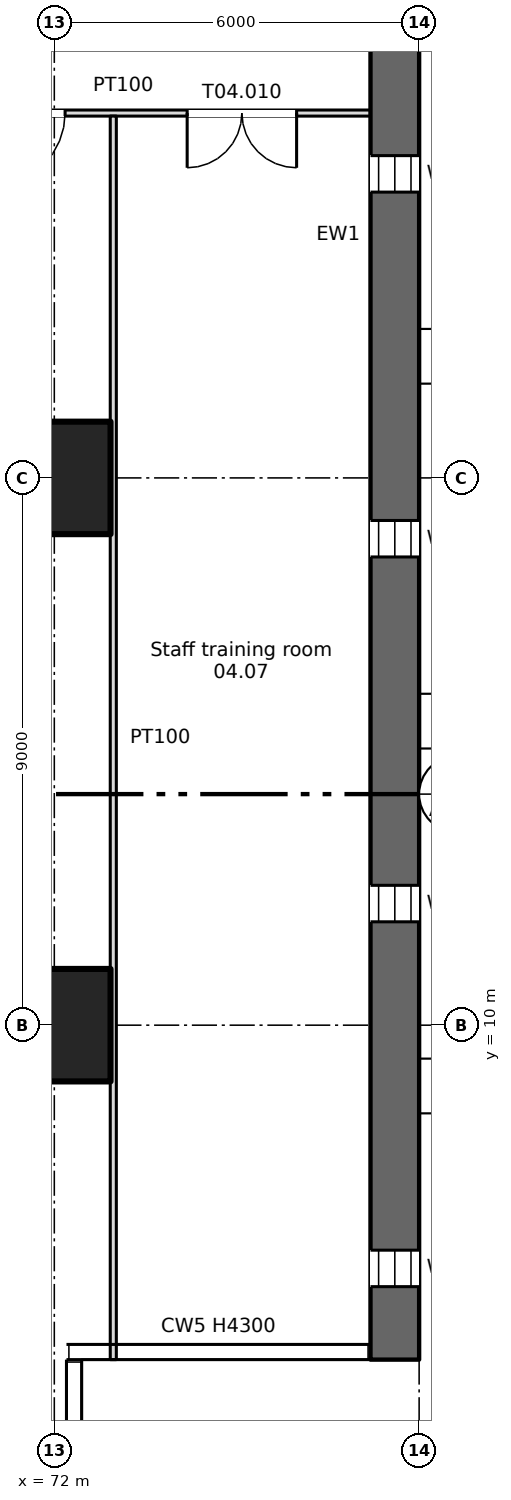
"""IFC4 building model, lengths in metres.
Left out: names, types, materials, properties, quantities, classifications, styles, units other than length and angle.
Written with IfcOpenShell. Run it as: python <this file> out.ifc"""

import sys

from ifc_helpers import new_model, si_unit, direction, frame, frame_2d, origin, origin_2d, place, context, subcontext, project, spatial, rectangle, extrude, element, fill, save


model = new_model("IFC4")
c1 = context("Model", 3, precision=1e-05, world=origin(), true_north=direction((0.0, 1.0)))
c2 = subcontext(c1, "Body", "Model", "MODEL_VIEW")
j1 = project(units=[si_unit("LENGTHUNIT", "METRE"), si_unit("PLANEANGLEUNIT", "RADIAN")], contexts=[c1])
p1 = place(None, origin())
s1 = spatial("IfcSite", under=j1, at=p1, CompositionType="ELEMENT")
p2 = place(p1, origin())
s2 = spatial("IfcBuilding", under=s1, at=p2, CompositionType="ELEMENT")
p3 = place(p2, frame((0.0, 0.0, 6.5)))
s3 = spatial("IfcBuildingStorey", under=s2, at=p3, CompositionType="ELEMENT", Elevation=6.5)
for number, where, z_axis, x_axis in (
    (1, (72.0, 10.0, 0.0), (0.0, 0.0, 1.0), (1.0, 0.0, 0.0)),
    (2, (72.0, 19.0, 0.0), (0.0, 0.0, 1.0), (1.0, 0.0, 0.0)),
):
    element("IfcColumn", number, at=place(p3, frame(where, z_axis=z_axis, x_axis=x_axis)), inside=s3, PredefinedType="COLUMN", context=c2, shape_type="SweptSolid", body=[
        extrude(rectangle(XDim=1.85, YDim=1.85, at=origin_2d()), origin(), (0.0, 0.0, 1.0), 4.3),
    ])
p4 = place(p3, frame((77.6, 4.5, 0.0), z_axis=(0.0, 0.0, 1.0), x_axis=(0.0, 1.0, 0.0)))
e3 = element("IfcWall", 3, at=p4, inside=s3, PredefinedType="SHEAR", context=c2, shape_type="SweptSolid", body=[
    extrude(rectangle(XDim=37.0, YDim=0.8, at=frame_2d((18.5, 0.0))), origin(), (0.0, 0.0, 1.0), 4.3),
])
p5 = place(p4, frame((1.2, 0.0, 0.6)))
e4 = element("IfcOpeningElement", 4, at=p5, cuts=e3, PredefinedType="OPENING", context=c2, shape_type="SweptSolid", body=[
    extrude(rectangle(XDim=0.6, YDim=2.7, at=frame_2d((0.3, 1.35))), frame((0.0, 0.41, 0.0), z_axis=(0.0, -1.0, 0.0), x_axis=(1.0, 0.0, 0.0)), (0.0, 0.0, 1.0), 0.82),
])
p6 = place(p4, frame((7.2, 0.0, 0.6)))
e5 = element("IfcOpeningElement", 5, at=p6, cuts=e3, PredefinedType="OPENING", context=c2, shape_type="SweptSolid", body=[
    extrude(rectangle(XDim=0.6, YDim=2.7, at=frame_2d((0.3, 1.35))), frame((0.0, 0.41, 0.0), z_axis=(0.0, -1.0, 0.0), x_axis=(1.0, 0.0, 0.0)), (0.0, 0.0, 1.0), 0.82),
])
p7 = place(p4, frame((13.2, 0.0, 0.6)))
e6 = element("IfcOpeningElement", 6, at=p7, cuts=e3, PredefinedType="OPENING", context=c2, shape_type="SweptSolid", body=[
    extrude(rectangle(XDim=0.6, YDim=2.7, at=frame_2d((0.3, 1.35))), frame((0.0, 0.41, 0.0), z_axis=(0.0, -1.0, 0.0), x_axis=(1.0, 0.0, 0.0)), (0.0, 0.0, 1.0), 0.82),
])
p8 = place(p4, frame((19.2, 0.0, 0.6)))
e7 = element("IfcOpeningElement", 7, at=p8, cuts=e3, PredefinedType="OPENING", context=c2, shape_type="SweptSolid", body=[
    extrude(rectangle(XDim=0.6, YDim=2.7, at=frame_2d((0.3, 1.35))), frame((0.0, 0.41, 0.0), z_axis=(0.0, -1.0, 0.0), x_axis=(1.0, 0.0, 0.0)), (0.0, 0.0, 1.0), 0.82),
])
p9 = place(p3, frame((67.44, 25.0, 0.0), z_axis=(0.0, 0.0, 1.0), x_axis=(1.0, 0.0, 0.0)))
e8 = element("IfcWall", 8, at=p9, inside=s3, PredefinedType="PARTITIONING", context=c2, shape_type="SweptSolid", body=[
    extrude(rectangle(XDim=9.76, YDim=0.1, at=frame_2d((4.88, 0.0))), origin(), (0.0, 0.0, 1.0), 4.3),
])
p10 = place(p9, frame((0.752, 0.0, 0.0)))
e9 = element("IfcOpeningElement", 9, at=p10, cuts=e8, PredefinedType="OPENING", context=c2, shape_type="SweptSolid", body=[
    extrude(rectangle(XDim=1.2, YDim=2.1, at=frame_2d((0.6, 1.05))), frame((0.0, 0.06, 0.0), z_axis=(0.0, -1.0, 0.0), x_axis=(1.0, 0.0, 0.0)), (0.0, 0.0, 1.0), 0.12),
])
p11 = place(p9, frame((3.538, 0.0, 0.0)))
e10 = element("IfcOpeningElement", 10, at=p11, cuts=e8, PredefinedType="OPENING", context=c2, shape_type="SweptSolid", body=[
    extrude(rectangle(XDim=1.2, YDim=2.1, at=frame_2d((0.6, 1.05))), frame((0.0, 0.06, 0.0), z_axis=(0.0, -1.0, 0.0), x_axis=(1.0, 0.0, 0.0)), (0.0, 0.0, 1.0), 0.12),
])
p12 = place(p9, frame((6.745, 0.0, 0.0)))
e11 = element("IfcOpeningElement", 11, at=p12, cuts=e8, PredefinedType="OPENING", context=c2, shape_type="SweptSolid", body=[
    extrude(rectangle(XDim=1.8, YDim=2.1, at=frame_2d((0.9, 1.05))), frame((0.0, 0.06, 0.0), z_axis=(0.0, -1.0, 0.0), x_axis=(1.0, 0.0, 0.0)), (0.0, 0.0, 1.0), 0.12),
])
p13 = place(p3, frame((72.97, 4.5, 0.0), z_axis=(0.0, 0.0, 1.0), x_axis=(0.0, 1.0, 0.0)))
e12 = element("IfcWall", 12, at=p13, inside=s3, PredefinedType="PARTITIONING", context=c2, shape_type="SweptSolid", body=[
    extrude(rectangle(XDim=20.45, YDim=0.1, at=frame_2d((10.225, 0.0))), origin(), (0.0, 0.0, 1.0), 4.3),
])
p14 = place(p5, origin())
e13 = element("IfcWindow", 13, at=p14, inside=s3, PartitioningType="SINGLE_PANEL", PredefinedType="WINDOW", context=c2, shape_type="SweptSolid", body=[
    extrude(rectangle(XDim=0.6, YDim=2.7, at=frame_2d((0.3, 1.35))), frame((0.0, 0.03, 0.0), z_axis=(0.0, -1.0, 0.0), x_axis=(1.0, 0.0, 0.0)), (0.0, 0.0, 1.0), 0.06),
])
fill(e4, e13)
p15 = place(p6, origin())
e14 = element("IfcWindow", 14, at=p15, inside=s3, PartitioningType="SINGLE_PANEL", PredefinedType="WINDOW", context=c2, shape_type="SweptSolid", body=[
    extrude(rectangle(XDim=0.6, YDim=2.7, at=frame_2d((0.3, 1.35))), frame((0.0, 0.03, 0.0), z_axis=(0.0, -1.0, 0.0), x_axis=(1.0, 0.0, 0.0)), (0.0, 0.0, 1.0), 0.06),
])
fill(e5, e14)
p16 = place(p7, origin())
e15 = element("IfcWindow", 15, at=p16, inside=s3, PartitioningType="SINGLE_PANEL", PredefinedType="WINDOW", context=c2, shape_type="SweptSolid", body=[
    extrude(rectangle(XDim=0.6, YDim=2.7, at=frame_2d((0.3, 1.35))), frame((0.0, 0.03, 0.0), z_axis=(0.0, -1.0, 0.0), x_axis=(1.0, 0.0, 0.0)), (0.0, 0.0, 1.0), 0.06),
])
fill(e6, e15)
p17 = place(p8, origin())
e16 = element("IfcWindow", 16, at=p17, inside=s3, PartitioningType="SINGLE_PANEL", PredefinedType="WINDOW", context=c2, shape_type="SweptSolid", body=[
    extrude(rectangle(XDim=0.6, YDim=2.7, at=frame_2d((0.3, 1.35))), frame((0.0, 0.03, 0.0), z_axis=(0.0, -1.0, 0.0), x_axis=(1.0, 0.0, 0.0)), (0.0, 0.0, 1.0), 0.06),
])
fill(e7, e16)
p18 = place(p11, origin())
e17 = element("IfcDoor", 17, at=p18, inside=s3, OperationType="SINGLE_SWING_LEFT", PredefinedType="DOOR", context=c2, shape_type="SweptSolid", body=[
    extrude(rectangle(XDim=1.2, YDim=2.1, at=frame_2d((0.6, 1.05))), frame((0.0, 0.025, 0.0), z_axis=(0.0, -1.0, 0.0), x_axis=(1.0, 0.0, 0.0)), (0.0, 0.0, 1.0), 0.05),
])
fill(e10, e17)
p19 = place(p12, origin())
e18 = element("IfcDoor", 18, at=p19, inside=s3, OperationType="DOUBLE_DOOR_SINGLE_SWING", PredefinedType="DOOR", context=c2, shape_type="SweptSolid", body=[
    extrude(rectangle(XDim=1.8, YDim=2.1, at=frame_2d((0.9, 1.05))), frame((0.0, 0.025, 0.0), z_axis=(0.0, -1.0, 0.0), x_axis=(1.0, 0.0, 0.0)), (0.0, 0.0, 1.0), 0.05),
])
fill(e11, e18)
save(model, sys.argv[1])
